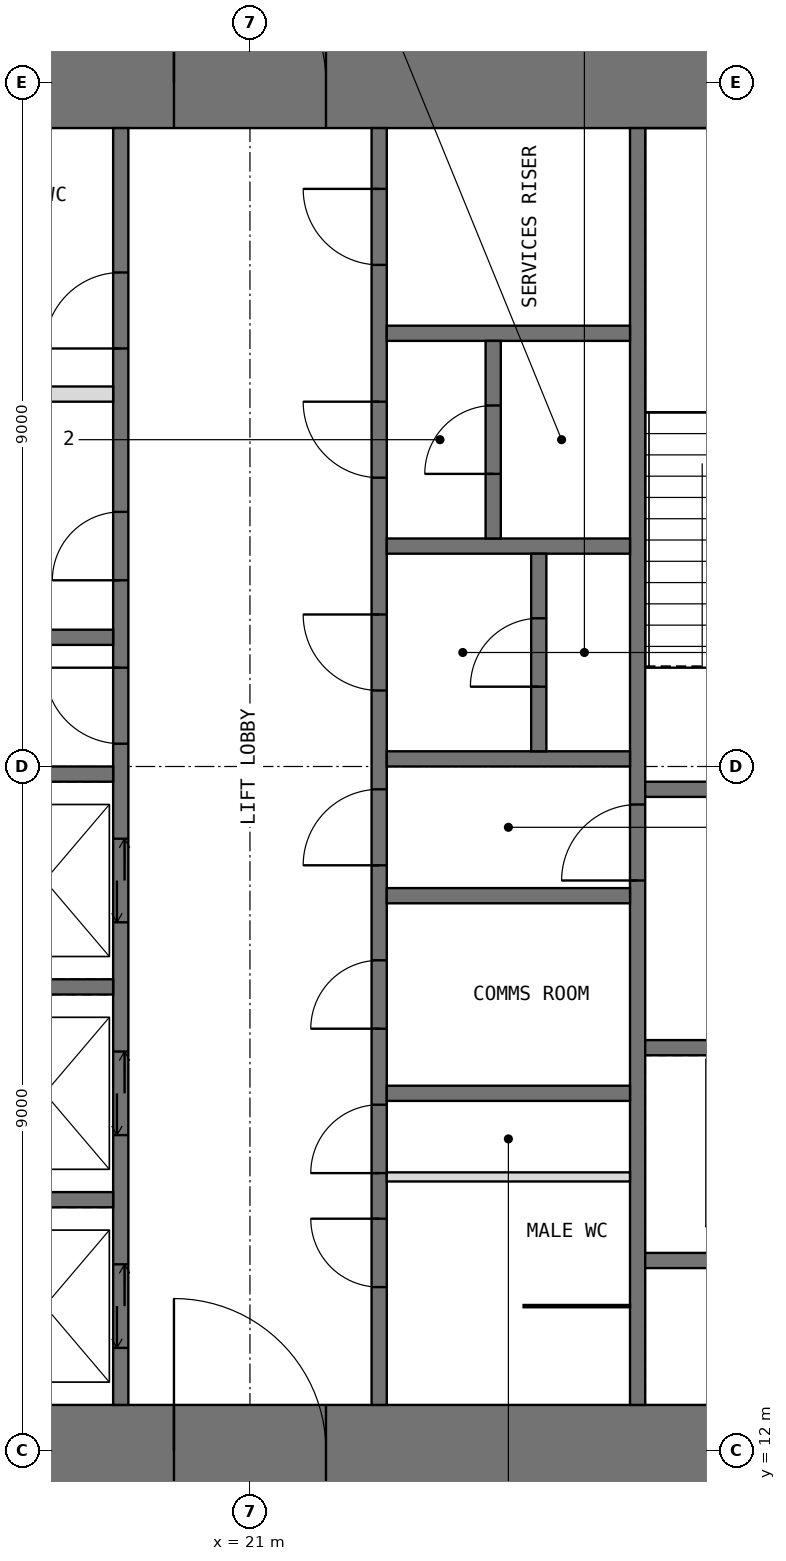
"""IFC4 building model, lengths in metres.
Left out: names, types, materials, properties, quantities, classifications, styles, units other than length and angle.
Written with IfcOpenShell. Run it as: python <this file> out.ifc"""

import sys

from ifc_helpers import new_model, si_unit, direction, frame, frame_2d, origin, place, context, subcontext, project, spatial, rectangle, extrude, element, fill, save


model = new_model("IFC4")
c1 = context("Model", 3, precision=1e-05, world=origin(), true_north=direction((0.0, 1.0)))
c2 = subcontext(c1, "Body", "Model", "MODEL_VIEW")
j1 = project(units=[si_unit("LENGTHUNIT", "METRE"), si_unit("PLANEANGLEUNIT", "RADIAN")], contexts=[c1])
p1 = place(None, origin())
s1 = spatial("IfcSite", under=j1, at=p1, CompositionType="ELEMENT")
p2 = place(p1, origin())
s2 = spatial("IfcBuilding", under=s1, at=p2, CompositionType="ELEMENT")
p3 = place(p2, frame((0.0, 0.0, 269.2)))
s3 = spatial("IfcBuildingStorey", under=s2, at=p3, CompositionType="ELEMENT", Elevation=269.2)
p4 = place(p3, frame((11.4, 12.0, -0.05), z_axis=(0.0, 0.0, 1.0), x_axis=(1.0, 0.0, 0.0)))
e1 = element("IfcWall", 1, at=p4, inside=s3, PredefinedType="SHEAR", context=c2, shape_type="SweptSolid", body=[
    extrude(rectangle(XDim=19.2, YDim=1.2, at=frame_2d((9.6, 0.0))), origin(), (0.0, 0.0, 1.0), 4.2),
])
p5 = place(p4, frame((8.6, 0.0, 0.05)))
e2 = element("IfcOpeningElement", 2, at=p5, cuts=e1, PredefinedType="OPENING", context=c2, shape_type="SweptSolid", body=[
    extrude(rectangle(XDim=2.0, YDim=2.2, at=frame_2d((1.0, 1.1))), frame((0.0, 0.61, 0.0), z_axis=(0.0, -1.0, 0.0), x_axis=(1.0, 0.0, 0.0)), (0.0, 0.0, 1.0), 1.22),
])
p6 = place(p3, frame((11.4, 30.0, -0.05), z_axis=(0.0, 0.0, 1.0), x_axis=(1.0, 0.0, 0.0)))
e3 = element("IfcWall", 3, at=p6, inside=s3, PredefinedType="SHEAR", context=c2, shape_type="SweptSolid", body=[
    extrude(rectangle(XDim=19.2, YDim=1.2, at=frame_2d((9.6, 0.0))), origin(), (0.0, 0.0, 1.0), 4.2),
])
p7 = place(p6, frame((8.6, 0.0, 0.05)))
e4 = element("IfcOpeningElement", 4, at=p7, cuts=e3, PredefinedType="OPENING", context=c2, shape_type="SweptSolid", body=[
    extrude(rectangle(XDim=2.0, YDim=2.2, at=frame_2d((1.0, 1.1))), frame((0.0, 0.61, 0.0), z_axis=(0.0, -1.0, 0.0), x_axis=(1.0, 0.0, 0.0)), (0.0, 0.0, 1.0), 1.22),
])
p8 = place(p3, frame((19.3, 12.6, -0.05), z_axis=(0.0, 0.0, 1.0), x_axis=(0.0, 1.0, 0.0)))
e5 = element("IfcWall", 5, at=p8, inside=s3, PredefinedType="SHEAR", context=c2, shape_type="SweptSolid", body=[
    extrude(rectangle(XDim=16.8, YDim=0.2, at=frame_2d((8.4, 0.0))), origin(), (0.0, 0.0, 1.0), 4.2),
])
p9 = place(p8, frame((8.7, 0.0, 0.05)))
e6 = element("IfcOpeningElement", 6, at=p9, cuts=e5, PredefinedType="OPENING", context=c2, shape_type="SweptSolid", body=[
    extrude(rectangle(XDim=1.0, YDim=2.2, at=frame_2d((0.5, 1.1))), frame((0.0, 0.11, 0.0), z_axis=(0.0, -1.0, 0.0), x_axis=(1.0, 0.0, 0.0)), (0.0, 0.0, 1.0), 0.22),
])
p10 = place(p8, frame((10.85, 0.0, 0.05)))
e7 = element("IfcOpeningElement", 7, at=p10, cuts=e5, PredefinedType="OPENING", context=c2, shape_type="SweptSolid", body=[
    extrude(rectangle(XDim=0.9, YDim=2.2, at=frame_2d((0.45, 1.1))), frame((0.0, 0.11, 0.0), z_axis=(0.0, -1.0, 0.0), x_axis=(1.0, 0.0, 0.0)), (0.0, 0.0, 1.0), 0.22),
])
p11 = place(p8, frame((13.9, 0.0, 0.05)))
e8 = element("IfcOpeningElement", 8, at=p11, cuts=e5, PredefinedType="OPENING", context=c2, shape_type="SweptSolid", body=[
    extrude(rectangle(XDim=1.0, YDim=2.2, at=frame_2d((0.5, 1.1))), frame((0.0, 0.11, 0.0), z_axis=(0.0, -1.0, 0.0), x_axis=(1.0, 0.0, 0.0)), (0.0, 0.0, 1.0), 0.22),
])
p12 = place(p8, frame((0.75, 0.0, 0.05)))
e9 = element("IfcOpeningElement", 9, at=p12, cuts=e5, PredefinedType="OPENING", context=c2, shape_type="SweptSolid", body=[
    extrude(rectangle(XDim=1.1, YDim=2.2, at=frame_2d((0.55, 1.1))), frame((0.0, 0.11, 0.0), z_axis=(0.0, -1.0, 0.0), x_axis=(1.0, 0.0, 0.0)), (0.0, 0.0, 1.0), 0.22),
])
p13 = place(p8, frame((3.55, 0.0, 0.05)))
e10 = element("IfcOpeningElement", 10, at=p13, cuts=e5, PredefinedType="OPENING", context=c2, shape_type="SweptSolid", body=[
    extrude(rectangle(XDim=1.1, YDim=2.2, at=frame_2d((0.55, 1.1))), frame((0.0, 0.11, 0.0), z_axis=(0.0, -1.0, 0.0), x_axis=(1.0, 0.0, 0.0)), (0.0, 0.0, 1.0), 0.22),
])
p14 = place(p8, frame((6.35, 0.0, 0.05)))
e11 = element("IfcOpeningElement", 11, at=p14, cuts=e5, PredefinedType="OPENING", context=c2, shape_type="SweptSolid", body=[
    extrude(rectangle(XDim=1.1, YDim=2.2, at=frame_2d((0.55, 1.1))), frame((0.0, 0.11, 0.0), z_axis=(0.0, -1.0, 0.0), x_axis=(1.0, 0.0, 0.0)), (0.0, 0.0, 1.0), 0.22),
])
p15 = place(p3, frame((22.7, 12.6, -0.05), z_axis=(0.0, 0.0, 1.0), x_axis=(0.0, 1.0, 0.0)))
e12 = element("IfcWall", 12, at=p15, inside=s3, PredefinedType="SHEAR", context=c2, shape_type="SweptSolid", body=[
    extrude(rectangle(XDim=16.8, YDim=0.2, at=frame_2d((8.4, 0.0))), origin(), (0.0, 0.0, 1.0), 4.2),
])
p16 = place(p15, frame((3.05, 0.0, 0.05)))
e13 = element("IfcOpeningElement", 13, at=p16, cuts=e12, PredefinedType="OPENING", context=c2, shape_type="SweptSolid", body=[
    extrude(rectangle(XDim=0.9, YDim=2.2, at=frame_2d((0.45, 1.1))), frame((0.0, 0.11, 0.0), z_axis=(0.0, -1.0, 0.0), x_axis=(1.0, 0.0, 0.0)), (0.0, 0.0, 1.0), 0.22),
])
p17 = place(p15, frame((7.1, 0.0, 0.05)))
e14 = element("IfcOpeningElement", 14, at=p17, cuts=e12, PredefinedType="OPENING", context=c2, shape_type="SweptSolid", body=[
    extrude(rectangle(XDim=1.0, YDim=2.2, at=frame_2d((0.5, 1.1))), frame((0.0, 0.11, 0.0), z_axis=(0.0, -1.0, 0.0), x_axis=(1.0, 0.0, 0.0)), (0.0, 0.0, 1.0), 0.22),
])
p18 = place(p15, frame((1.55, 0.0, 0.05)))
e15 = element("IfcOpeningElement", 15, at=p18, cuts=e12, PredefinedType="OPENING", context=c2, shape_type="SweptSolid", body=[
    extrude(rectangle(XDim=0.9, YDim=2.2, at=frame_2d((0.45, 1.1))), frame((0.0, 0.11, 0.0), z_axis=(0.0, -1.0, 0.0), x_axis=(1.0, 0.0, 0.0)), (0.0, 0.0, 1.0), 0.22),
])
p19 = place(p15, frame((4.95, 0.0, 0.05)))
e16 = element("IfcOpeningElement", 16, at=p19, cuts=e12, PredefinedType="OPENING", context=c2, shape_type="SweptSolid", body=[
    extrude(rectangle(XDim=0.9, YDim=2.2, at=frame_2d((0.45, 1.1))), frame((0.0, 0.11, 0.0), z_axis=(0.0, -1.0, 0.0), x_axis=(1.0, 0.0, 0.0)), (0.0, 0.0, 1.0), 0.22),
])
p20 = place(p15, frame((9.4, 0.0, 0.05)))
e17 = element("IfcOpeningElement", 17, at=p20, cuts=e12, PredefinedType="OPENING", context=c2, shape_type="SweptSolid", body=[
    extrude(rectangle(XDim=1.0, YDim=2.2, at=frame_2d((0.5, 1.1))), frame((0.0, 0.11, 0.0), z_axis=(0.0, -1.0, 0.0), x_axis=(1.0, 0.0, 0.0)), (0.0, 0.0, 1.0), 0.22),
])
p21 = place(p15, frame((12.2, 0.0, 0.05)))
e18 = element("IfcOpeningElement", 18, at=p21, cuts=e12, PredefinedType="OPENING", context=c2, shape_type="SweptSolid", body=[
    extrude(rectangle(XDim=1.0, YDim=2.2, at=frame_2d((0.5, 1.1))), frame((0.0, 0.11, 0.0), z_axis=(0.0, -1.0, 0.0), x_axis=(1.0, 0.0, 0.0)), (0.0, 0.0, 1.0), 0.22),
])
p22 = place(p15, frame((15.0, 0.0, 0.05)))
e19 = element("IfcOpeningElement", 19, at=p22, cuts=e12, PredefinedType="OPENING", context=c2, shape_type="SweptSolid", body=[
    extrude(rectangle(XDim=1.0, YDim=2.2, at=frame_2d((0.5, 1.1))), frame((0.0, 0.11, 0.0), z_axis=(0.0, -1.0, 0.0), x_axis=(1.0, 0.0, 0.0)), (0.0, 0.0, 1.0), 0.22),
])
p23 = place(p3, frame((26.1, 12.6, -0.05), z_axis=(0.0, 0.0, 1.0), x_axis=(0.0, 1.0, 0.0)))
e20 = element("IfcWall", 20, at=p23, inside=s3, PredefinedType="SHEAR", context=c2, shape_type="SweptSolid", body=[
    extrude(rectangle(XDim=16.8, YDim=0.2, at=frame_2d((8.4, 0.0))), origin(), (0.0, 0.0, 1.0), 4.2),
])
p24 = place(p23, frame((6.9, 0.0, 0.05)))
e21 = element("IfcOpeningElement", 21, at=p24, cuts=e20, PredefinedType="OPENING", context=c2, shape_type="SweptSolid", body=[
    extrude(rectangle(XDim=1.0, YDim=2.2, at=frame_2d((0.5, 1.1))), frame((0.0, 0.11, 0.0), z_axis=(0.0, -1.0, 0.0), x_axis=(1.0, 0.0, 0.0)), (0.0, 0.0, 1.0), 0.22),
])
for number, where, z_axis, x_axis in (
    (22, (16.0, 15.3, -0.05), (0.0, 0.0, 1.0), (1.0, 0.0, 0.0)),
    (23, (16.0, 18.1, -0.05), (0.0, 0.0, 1.0), (1.0, 0.0, 0.0)),
    (24, (16.0, 20.9, -0.05), (0.0, 0.0, 1.0), (1.0, 0.0, 0.0)),
    (25, (16.0, 22.7, -0.05), (0.0, 0.0, 1.0), (1.0, 0.0, 0.0)),
):
    element("IfcWall", number, at=place(p3, frame(where, z_axis=z_axis, x_axis=x_axis)), inside=s3, PredefinedType="SHEAR", context=c2, shape_type="SweptSolid", body=[
        extrude(rectangle(XDim=3.2, YDim=0.2, at=frame_2d((1.6, 0.0))), origin(), (0.0, 0.0, 1.0), 4.2),
    ])
p25 = place(p3, frame((16.0, 25.9, 0.0), z_axis=(0.0, 0.0, 1.0), x_axis=(1.0, 0.0, 0.0)))
e26 = element("IfcWall", 26, at=p25, inside=s3, PredefinedType="PARTITIONING", context=c2, shape_type="SweptSolid", body=[
    extrude(rectangle(XDim=3.2, YDim=0.2, at=frame_2d((1.6, 0.0))), origin(), (0.0, 0.0, 1.0), 3.95),
])
for number, where, z_axis, x_axis in (
    (27, (22.8, 16.7, -0.05), (0.0, 0.0, 1.0), (1.0, 0.0, 0.0)),
    (28, (22.8, 19.3, -0.05), (0.0, 0.0, 1.0), (1.0, 0.0, 0.0)),
    (29, (22.8, 21.1, -0.05), (0.0, 0.0, 1.0), (1.0, 0.0, 0.0)),
    (30, (22.8, 23.9, -0.05), (0.0, 0.0, 1.0), (1.0, 0.0, 0.0)),
    (31, (22.8, 26.7, -0.05), (0.0, 0.0, 1.0), (1.0, 0.0, 0.0)),
    (32, (26.2, 14.5, -0.05), (0.0, 0.0, 1.0), (1.0, 0.0, 0.0)),
):
    element("IfcWall", number, at=place(p3, frame(where, z_axis=z_axis, x_axis=x_axis)), inside=s3, PredefinedType="SHEAR", context=c2, shape_type="SweptSolid", body=[
        extrude(rectangle(XDim=3.2, YDim=0.2, at=frame_2d((1.6, 0.0))), origin(), (0.0, 0.0, 1.0), 4.2),
    ])
p26 = place(p3, frame((26.2, 17.3, -0.05), z_axis=(0.0, 0.0, 1.0), x_axis=(1.0, 0.0, 0.0)))
e33 = element("IfcWall", 33, at=p26, inside=s3, PredefinedType="SHEAR", context=c2, shape_type="SweptSolid", body=[
    extrude(rectangle(XDim=3.2, YDim=0.2, at=frame_2d((1.6, 0.0))), origin(), (0.0, 0.0, 1.0), 4.2),
])
p27 = place(p26, frame((1.0, 0.0, 0.05)))
e34 = element("IfcOpeningElement", 34, at=p27, cuts=e33, PredefinedType="OPENING", context=c2, shape_type="SweptSolid", body=[
    extrude(rectangle(XDim=1.2, YDim=2.2, at=frame_2d((0.6, 1.1))), frame((0.0, 0.11, 0.0), z_axis=(0.0, -1.0, 0.0), x_axis=(1.0, 0.0, 0.0)), (0.0, 0.0, 1.0), 0.22),
])
p28 = place(p3, frame((26.2, 20.7, -0.05), z_axis=(0.0, 0.0, 1.0), x_axis=(1.0, 0.0, 0.0)))
e35 = element("IfcWall", 35, at=p28, inside=s3, PredefinedType="SHEAR", context=c2, shape_type="SweptSolid", body=[
    extrude(rectangle(XDim=3.2, YDim=0.2, at=frame_2d((1.6, 0.0))), origin(), (0.0, 0.0, 1.0), 4.2),
])
p29 = place(p28, frame((1.1, 0.0, 0.05)))
e36 = element("IfcOpeningElement", 36, at=p29, cuts=e35, PredefinedType="OPENING", context=c2, shape_type="SweptSolid", body=[
    extrude(rectangle(XDim=1.0, YDim=2.2, at=frame_2d((0.5, 1.1))), frame((0.0, 0.11, 0.0), z_axis=(0.0, -1.0, 0.0), x_axis=(1.0, 0.0, 0.0)), (0.0, 0.0, 1.0), 0.22),
])
p30 = place(p3, frame((22.8, 15.6, 0.0), z_axis=(0.0, 0.0, 1.0), x_axis=(1.0, 0.0, 0.0)))
e37 = element("IfcWall", 37, at=p30, inside=s3, PredefinedType="PARTITIONING", context=c2, shape_type="SweptSolid", body=[
    extrude(rectangle(XDim=3.2, YDim=0.12, at=frame_2d((1.6, 0.0))), origin(), (0.0, 0.0, 1.0), 3.95),
])
p31 = place(p3, frame((24.6, 13.9, 0.0), z_axis=(0.0, 0.0, 1.0), x_axis=(1.0, 0.0, 0.0)))
e38 = element("IfcWall", 38, at=p31, inside=s3, PredefinedType="PARTITIONING", context=c2, shape_type="SweptSolid", body=[
    extrude(rectangle(XDim=1.4, YDim=0.03, at=frame_2d((0.7, 0.0))), origin(), (0.0, 0.0, 1.0), 3.95),
])
p32 = place(p3, frame((24.8, 21.2, -0.05), z_axis=(0.0, 0.0, 1.0), x_axis=(0.0, 1.0, 0.0)))
e39 = element("IfcWall", 39, at=p32, inside=s3, PredefinedType="SHEAR", context=c2, shape_type="SweptSolid", body=[
    extrude(rectangle(XDim=2.6, YDim=0.2, at=frame_2d((1.3, 0.0))), origin(), (0.0, 0.0, 1.0), 4.2),
])
p33 = place(p32, frame((0.85, 0.0, 0.05)))
e40 = element("IfcOpeningElement", 40, at=p33, cuts=e39, PredefinedType="OPENING", context=c2, shape_type="SweptSolid", body=[
    extrude(rectangle(XDim=0.9, YDim=2.2, at=frame_2d((0.45, 1.1))), frame((0.0, 0.11, 0.0), z_axis=(0.0, -1.0, 0.0), x_axis=(1.0, 0.0, 0.0)), (0.0, 0.0, 1.0), 0.22),
])
p34 = place(p3, frame((24.2, 24.0, -0.05), z_axis=(0.0, 0.0, 1.0), x_axis=(0.0, 1.0, 0.0)))
e41 = element("IfcWall", 41, at=p34, inside=s3, PredefinedType="SHEAR", context=c2, shape_type="SweptSolid", body=[
    extrude(rectangle(XDim=2.6, YDim=0.2, at=frame_2d((1.3, 0.0))), origin(), (0.0, 0.0, 1.0), 4.2),
])
p35 = place(p34, frame((0.85, 0.0, 0.05)))
e42 = element("IfcOpeningElement", 42, at=p35, cuts=e41, PredefinedType="OPENING", context=c2, shape_type="SweptSolid", body=[
    extrude(rectangle(XDim=0.9, YDim=2.2, at=frame_2d((0.45, 1.1))), frame((0.0, 0.11, 0.0), z_axis=(0.0, -1.0, 0.0), x_axis=(1.0, 0.0, 0.0)), (0.0, 0.0, 1.0), 0.22),
])
p36 = place(p5, origin())
e43 = element("IfcDoor", 43, at=p36, inside=s3, OperationType="DOUBLE_DOOR_SINGLE_SWING", PredefinedType="DOOR", context=c2, shape_type="SweptSolid", body=[
    extrude(rectangle(XDim=2.0, YDim=2.2, at=frame_2d((1.0, 1.1))), frame((0.0, 0.025, 0.0), z_axis=(0.0, -1.0, 0.0), x_axis=(1.0, 0.0, 0.0)), (0.0, 0.0, 1.0), 0.05),
])
fill(e2, e43)
p37 = place(p7, origin())
e44 = element("IfcDoor", 44, at=p37, inside=s3, OperationType="DOUBLE_DOOR_SINGLE_SWING", PredefinedType="DOOR", context=c2, shape_type="SweptSolid", body=[
    extrude(rectangle(XDim=2.0, YDim=2.2, at=frame_2d((1.0, 1.1))), frame((0.0, 0.025, 0.0), z_axis=(0.0, -1.0, 0.0), x_axis=(1.0, 0.0, 0.0)), (0.0, 0.0, 1.0), 0.05),
])
fill(e4, e44)
p38 = place(p16, origin())
e45 = element("IfcDoor", 45, at=p38, inside=s3, OperationType="SINGLE_SWING_LEFT", PredefinedType="DOOR", context=c2, shape_type="SweptSolid", body=[
    extrude(rectangle(XDim=0.9, YDim=2.2, at=frame_2d((0.45, 1.1))), frame((0.0, 0.025, 0.0), z_axis=(0.0, -1.0, 0.0), x_axis=(1.0, 0.0, 0.0)), (0.0, 0.0, 1.0), 0.05),
])
fill(e13, e45)
p39 = place(p24, origin())
e46 = element("IfcDoor", 46, at=p39, inside=s3, OperationType="SINGLE_SWING_LEFT", PredefinedType="DOOR", context=c2, shape_type="SweptSolid", body=[
    extrude(rectangle(XDim=1.0, YDim=2.2, at=frame_2d((0.5, 1.1))), frame((0.0, 0.025, 0.0), z_axis=(0.0, -1.0, 0.0), x_axis=(1.0, 0.0, 0.0)), (0.0, 0.0, 1.0), 0.05),
])
fill(e21, e46)
p40 = place(p9, origin())
e47 = element("IfcDoor", 47, at=p40, inside=s3, OperationType="SINGLE_SWING_RIGHT", PredefinedType="DOOR", context=c2, shape_type="SweptSolid", body=[
    extrude(rectangle(XDim=1.0, YDim=2.2, at=frame_2d((0.5, 1.1))), frame((0.0, 0.025, 0.0), z_axis=(0.0, -1.0, 0.0), x_axis=(1.0, 0.0, 0.0)), (0.0, 0.0, 1.0), 0.05),
])
fill(e6, e47)
p41 = place(p17, origin())
e48 = element("IfcDoor", 48, at=p41, inside=s3, OperationType="SINGLE_SWING_LEFT", PredefinedType="DOOR", context=c2, shape_type="SweptSolid", body=[
    extrude(rectangle(XDim=1.0, YDim=2.2, at=frame_2d((0.5, 1.1))), frame((0.0, 0.025, 0.0), z_axis=(0.0, -1.0, 0.0), x_axis=(1.0, 0.0, 0.0)), (0.0, 0.0, 1.0), 0.05),
])
fill(e14, e48)
p42 = place(p10, origin())
e49 = element("IfcDoor", 49, at=p42, inside=s3, OperationType="SINGLE_SWING_LEFT", PredefinedType="DOOR", context=c2, shape_type="SweptSolid", body=[
    extrude(rectangle(XDim=0.9, YDim=2.2, at=frame_2d((0.45, 1.1))), frame((0.0, 0.025, 0.0), z_axis=(0.0, -1.0, 0.0), x_axis=(1.0, 0.0, 0.0)), (0.0, 0.0, 1.0), 0.05),
])
fill(e7, e49)
p43 = place(p11, origin())
e50 = element("IfcDoor", 50, at=p43, inside=s3, OperationType="SINGLE_SWING_LEFT", PredefinedType="DOOR", context=c2, shape_type="SweptSolid", body=[
    extrude(rectangle(XDim=1.0, YDim=2.2, at=frame_2d((0.5, 1.1))), frame((0.0, 0.025, 0.0), z_axis=(0.0, -1.0, 0.0), x_axis=(1.0, 0.0, 0.0)), (0.0, 0.0, 1.0), 0.05),
])
fill(e8, e50)
p44 = place(p18, origin())
e51 = element("IfcDoor", 51, at=p44, inside=s3, OperationType="SINGLE_SWING_RIGHT", PredefinedType="DOOR", context=c2, shape_type="SweptSolid", body=[
    extrude(rectangle(XDim=0.9, YDim=2.2, at=frame_2d((0.45, 1.1))), frame((0.0, 0.025, 0.0), z_axis=(0.0, -1.0, 0.0), x_axis=(1.0, 0.0, 0.0)), (0.0, 0.0, 1.0), 0.05),
])
fill(e15, e51)
p45 = place(p19, origin())
e52 = element("IfcDoor", 52, at=p45, inside=s3, OperationType="SINGLE_SWING_LEFT", PredefinedType="DOOR", context=c2, shape_type="SweptSolid", body=[
    extrude(rectangle(XDim=0.9, YDim=2.2, at=frame_2d((0.45, 1.1))), frame((0.0, 0.025, 0.0), z_axis=(0.0, -1.0, 0.0), x_axis=(1.0, 0.0, 0.0)), (0.0, 0.0, 1.0), 0.05),
])
fill(e16, e52)
p46 = place(p20, origin())
e53 = element("IfcDoor", 53, at=p46, inside=s3, OperationType="SINGLE_SWING_RIGHT", PredefinedType="DOOR", context=c2, shape_type="SweptSolid", body=[
    extrude(rectangle(XDim=1.0, YDim=2.2, at=frame_2d((0.5, 1.1))), frame((0.0, 0.025, 0.0), z_axis=(0.0, -1.0, 0.0), x_axis=(1.0, 0.0, 0.0)), (0.0, 0.0, 1.0), 0.05),
])
fill(e17, e53)
p47 = place(p33, origin())
e54 = element("IfcDoor", 54, at=p47, inside=s3, OperationType="SINGLE_SWING_LEFT", PredefinedType="DOOR", context=c2, shape_type="SweptSolid", body=[
    extrude(rectangle(XDim=0.9, YDim=2.2, at=frame_2d((0.45, 1.1))), frame((0.0, 0.025, 0.0), z_axis=(0.0, -1.0, 0.0), x_axis=(1.0, 0.0, 0.0)), (0.0, 0.0, 1.0), 0.05),
])
fill(e40, e54)
p48 = place(p21, origin())
e55 = element("IfcDoor", 55, at=p48, inside=s3, OperationType="SINGLE_SWING_RIGHT", PredefinedType="DOOR", context=c2, shape_type="SweptSolid", body=[
    extrude(rectangle(XDim=1.0, YDim=2.2, at=frame_2d((0.5, 1.1))), frame((0.0, 0.025, 0.0), z_axis=(0.0, -1.0, 0.0), x_axis=(1.0, 0.0, 0.0)), (0.0, 0.0, 1.0), 0.05),
])
fill(e18, e55)
p49 = place(p35, origin())
e56 = element("IfcDoor", 56, at=p49, inside=s3, OperationType="SINGLE_SWING_LEFT", PredefinedType="DOOR", context=c2, shape_type="SweptSolid", body=[
    extrude(rectangle(XDim=0.9, YDim=2.2, at=frame_2d((0.45, 1.1))), frame((0.0, 0.025, 0.0), z_axis=(0.0, -1.0, 0.0), x_axis=(1.0, 0.0, 0.0)), (0.0, 0.0, 1.0), 0.05),
])
fill(e42, e56)
p50 = place(p22, origin())
e57 = element("IfcDoor", 57, at=p50, inside=s3, OperationType="SINGLE_SWING_RIGHT", PredefinedType="DOOR", context=c2, shape_type="SweptSolid", body=[
    extrude(rectangle(XDim=1.0, YDim=2.2, at=frame_2d((0.5, 1.1))), frame((0.0, 0.025, 0.0), z_axis=(0.0, -1.0, 0.0), x_axis=(1.0, 0.0, 0.0)), (0.0, 0.0, 1.0), 0.05),
])
fill(e19, e57)
p51 = place(p12, origin())
e58 = element("IfcDoor", 58, at=p51, inside=s3, OperationType="DOUBLE_DOOR_SLIDING", PredefinedType="DOOR", context=c2, shape_type="SweptSolid", body=[
    extrude(rectangle(XDim=1.1, YDim=2.2, at=frame_2d((0.55, 1.1))), frame((0.0, 0.025, 0.0), z_axis=(0.0, -1.0, 0.0), x_axis=(1.0, 0.0, 0.0)), (0.0, 0.0, 1.0), 0.05),
])
fill(e9, e58)
p52 = place(p13, origin())
e59 = element("IfcDoor", 59, at=p52, inside=s3, OperationType="DOUBLE_DOOR_SLIDING", PredefinedType="DOOR", context=c2, shape_type="SweptSolid", body=[
    extrude(rectangle(XDim=1.1, YDim=2.2, at=frame_2d((0.55, 1.1))), frame((0.0, 0.025, 0.0), z_axis=(0.0, -1.0, 0.0), x_axis=(1.0, 0.0, 0.0)), (0.0, 0.0, 1.0), 0.05),
])
fill(e10, e59)
p53 = place(p14, origin())
e60 = element("IfcDoor", 60, at=p53, inside=s3, OperationType="DOUBLE_DOOR_SLIDING", PredefinedType="DOOR", context=c2, shape_type="SweptSolid", body=[
    extrude(rectangle(XDim=1.1, YDim=2.2, at=frame_2d((0.55, 1.1))), frame((0.0, 0.025, 0.0), z_axis=(0.0, -1.0, 0.0), x_axis=(1.0, 0.0, 0.0)), (0.0, 0.0, 1.0), 0.05),
])
fill(e11, e60)
save(model, sys.argv[1])
